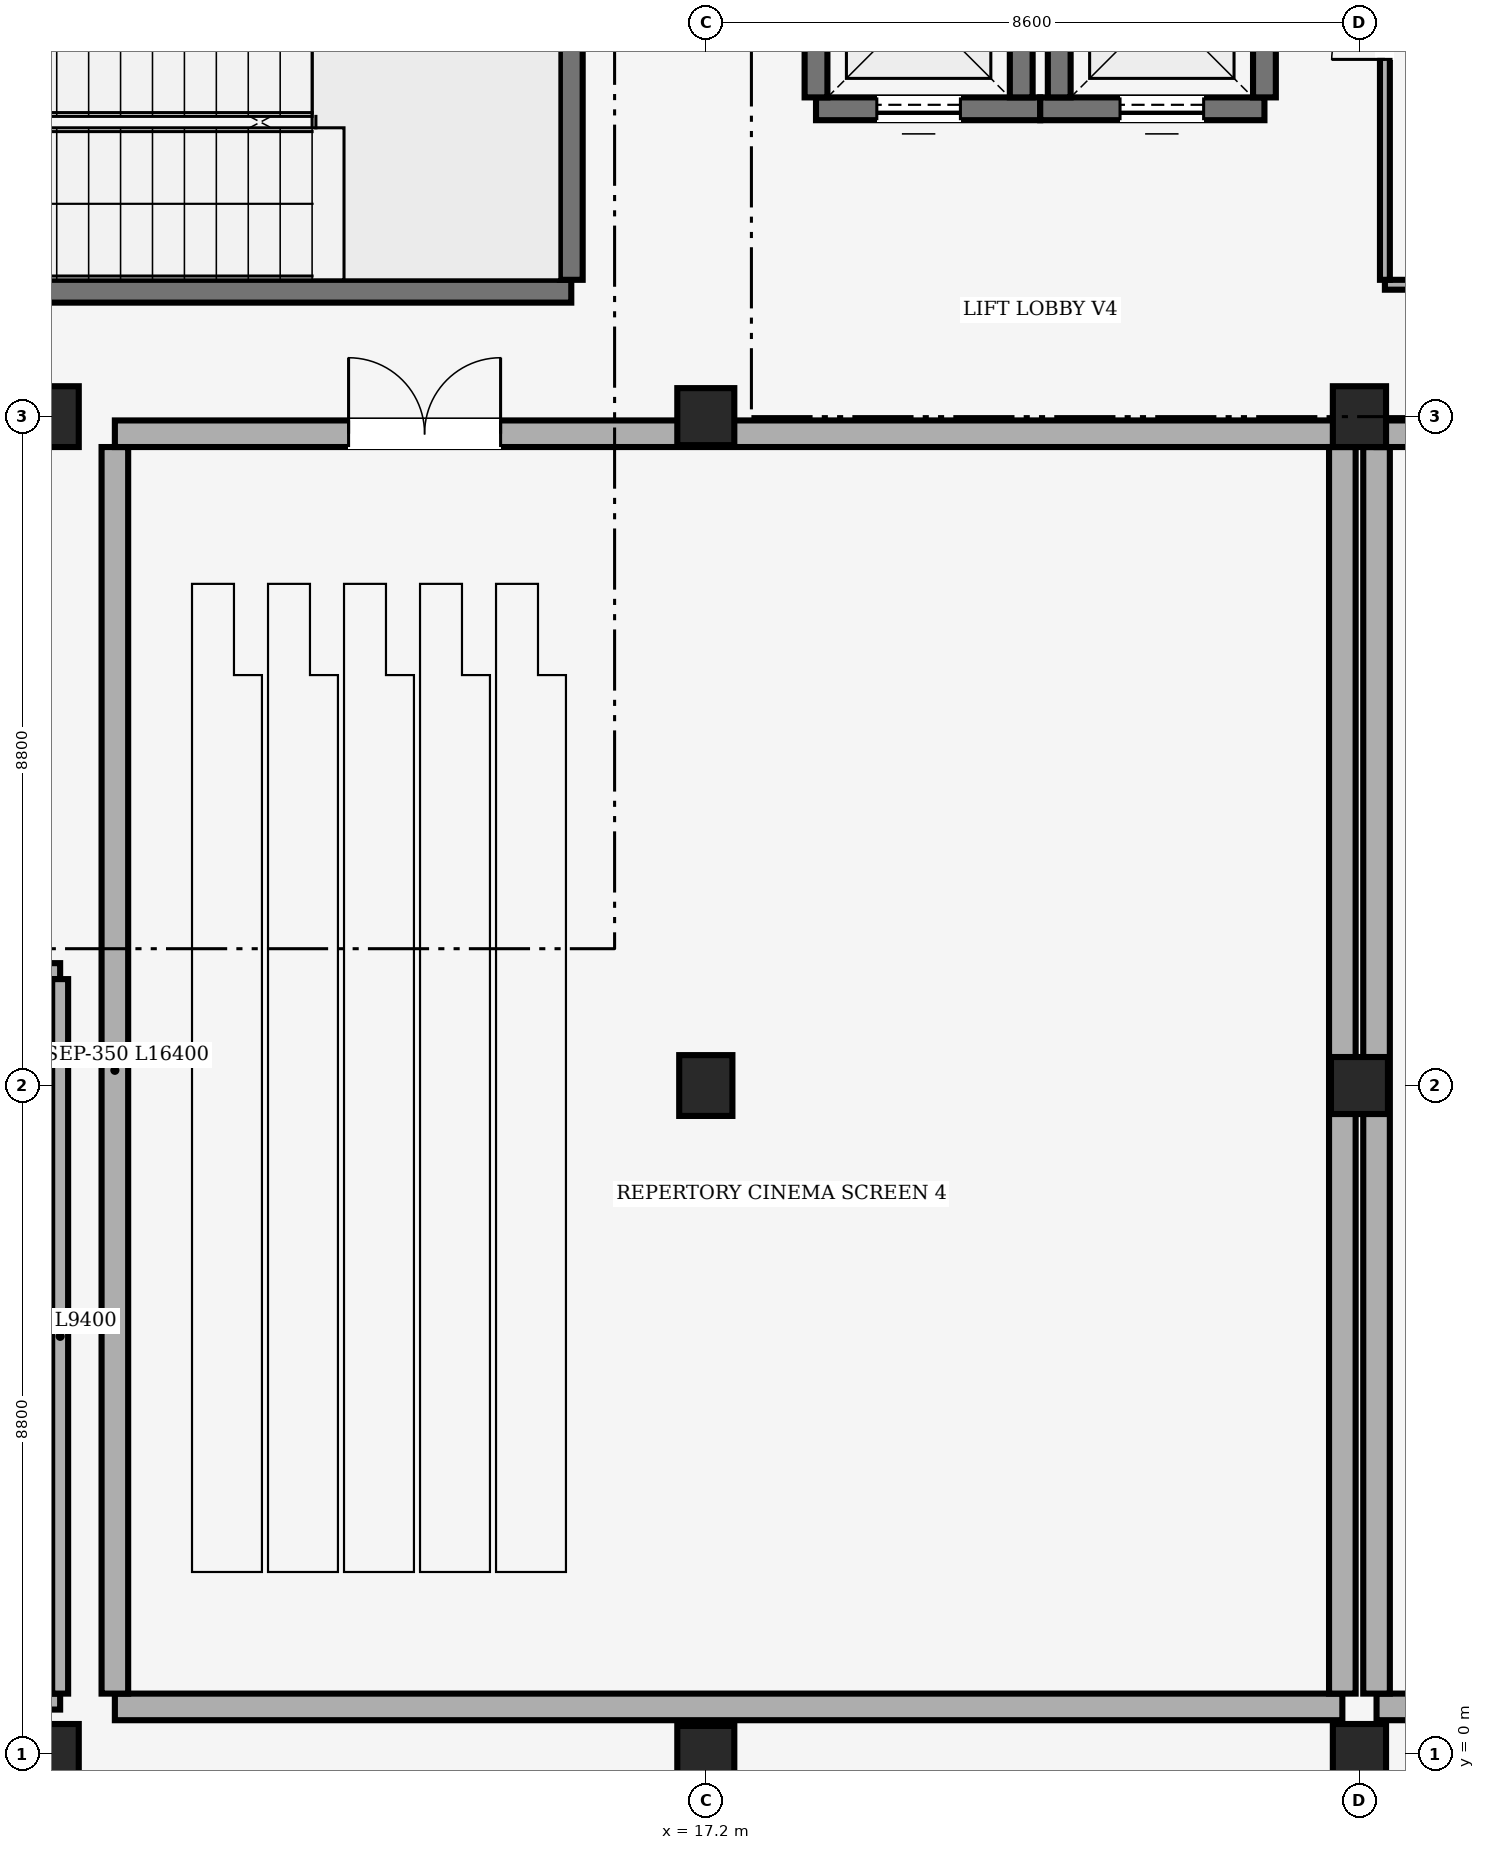
"""IFC4 building model, lengths in metres.
Left out: names, types, materials, properties, quantities, classifications, styles, units other than length and angle.
Written with IfcOpenShell. Run it as: python <this file> out.ifc"""

import sys

from ifc_helpers import new_model, si_unit, direction, frame, frame_2d, origin, origin_2d, place, context, subcontext, project, spatial, rectangle, extrude, element, fill, save


model = new_model("IFC4")
c1 = context("Model", 3, precision=1e-05, world=origin(), true_north=direction((0.0, 1.0)))
c2 = subcontext(c1, "Body", "Model", "MODEL_VIEW")
j1 = project(units=[si_unit("LENGTHUNIT", "METRE"), si_unit("PLANEANGLEUNIT", "RADIAN")], contexts=[c1])
p1 = place(None, origin())
s1 = spatial("IfcSite", under=j1, at=p1, CompositionType="ELEMENT")
p2 = place(p1, origin())
s2 = spatial("IfcBuilding", under=s1, at=p2, CompositionType="ELEMENT")
p3 = place(p2, frame((0.0, 0.0, 12.0)))
s3 = spatial("IfcBuildingStorey", under=s2, at=p3, CompositionType="ELEMENT", Elevation=12.0)
for number, where, z_axis, x_axis in (
    (1, (8.6, 0.0, 0.0), (0.0, 0.0, 1.0), (1.0, 0.0, 0.0)),
    (2, (8.6, 17.6, 0.0), (0.0, 0.0, 1.0), (1.0, 0.0, 0.0)),
):
    element("IfcColumn", number, at=place(p3, frame(where, z_axis=z_axis, x_axis=x_axis)), inside=s3, PredefinedType="COLUMN", context=c2, shape_type="SweptSolid", body=[
        extrude(rectangle(XDim=0.7, YDim=0.8, at=origin_2d()), origin(), (0.0, 0.0, 1.0), 3.35),
    ])
p4 = place(p3, frame((17.2, 0.0, 0.0), z_axis=(0.0, 0.0, 1.0), x_axis=(1.0, 0.0, 0.0)))
e3 = element("IfcColumn", 3, at=p4, inside=s3, PredefinedType="COLUMN", context=c2, shape_type="SweptSolid", body=[
    extrude(rectangle(XDim=0.75, YDim=0.75, at=origin_2d()), origin(), (0.0, 0.0, 1.0), 3.35),
])
p5 = place(p3, frame((17.2, 8.8, 0.0), z_axis=(0.0, 0.0, 1.0), x_axis=(1.0, 0.0, 0.0)))
e4 = element("IfcColumn", 4, at=p5, inside=s3, PredefinedType="COLUMN", context=c2, shape_type="SweptSolid", body=[
    extrude(rectangle(XDim=0.7, YDim=0.8, at=origin_2d()), origin(), (0.0, 0.0, 1.0), 3.35),
])
p6 = place(p3, frame((17.2, 17.6, 0.0), z_axis=(0.0, 0.0, 1.0), x_axis=(1.0, 0.0, 0.0)))
e5 = element("IfcColumn", 5, at=p6, inside=s3, PredefinedType="COLUMN", context=c2, shape_type="SweptSolid", body=[
    extrude(rectangle(XDim=0.75, YDim=0.75, at=origin_2d()), origin(), (0.0, 0.0, 1.0), 3.35),
])
p7 = place(p3, frame((25.8, 0.0, 0.0), z_axis=(0.0, 0.0, 1.0), x_axis=(1.0, 0.0, 0.0)))
e6 = element("IfcColumn", 6, at=p7, inside=s3, PredefinedType="COLUMN", context=c2, shape_type="SweptSolid", body=[
    extrude(rectangle(XDim=0.7, YDim=0.8, at=origin_2d()), origin(), (0.0, 0.0, 1.0), 3.35),
])
p8 = place(p3, frame((25.8, 8.8, 0.0), z_axis=(0.0, 0.0, 1.0), x_axis=(1.0, 0.0, 0.0)))
e7 = element("IfcColumn", 7, at=p8, inside=s3, PredefinedType="COLUMN", context=c2, shape_type="SweptSolid", body=[
    extrude(rectangle(XDim=0.75, YDim=0.75, at=origin_2d()), origin(), (0.0, 0.0, 1.0), 3.35),
])
p9 = place(p3, frame((25.8, 17.6, 0.0), z_axis=(0.0, 0.0, 1.0), x_axis=(1.0, 0.0, 0.0)))
e8 = element("IfcColumn", 8, at=p9, inside=s3, PredefinedType="COLUMN", context=c2, shape_type="SweptSolid", body=[
    extrude(rectangle(XDim=0.7, YDim=0.8, at=origin_2d()), origin(), (0.0, 0.0, 1.0), 3.35),
])
p10 = place(p3, frame((15.43, 19.25, 0.0), z_axis=(0.0, 0.0, 1.0), x_axis=(-1.0, 0.0, 0.0)))
e9 = element("IfcWall", 9, at=p10, inside=s3, PredefinedType="SHEAR", context=c2, shape_type="SweptSolid", body=[
    extrude(rectangle(XDim=10.18, YDim=0.3, at=frame_2d((5.09, 0.0))), origin(), (0.0, 0.0, 1.0), 3.35),
])
p11 = place(p3, frame((15.43, 23.55, 0.0), z_axis=(0.0, 0.0, 1.0), x_axis=(0.0, -1.0, 0.0)))
e10 = element("IfcWall", 10, at=p11, inside=s3, PredefinedType="SHEAR", context=c2, shape_type="SweptSolid", body=[
    extrude(rectangle(XDim=4.15, YDim=0.3, at=frame_2d((2.075, 0.0))), origin(), (0.0, 0.0, 1.0), 3.35),
])
p12 = place(p3, frame((21.6, 21.65, 0.0), z_axis=(0.0, 0.0, 1.0), x_axis=(-1.0, 0.0, 0.0)))
e11 = element("IfcWall", 11, at=p12, inside=s3, PredefinedType="SHEAR", context=c2, shape_type="SweptSolid", body=[
    extrude(rectangle(XDim=2.95, YDim=0.3, at=frame_2d((1.475, 0.0))), origin(), (0.0, 0.0, 1.0), 3.35),
])
p13 = place(p12, frame((1.05, 0.0, 0.0)))
e12 = element("IfcOpeningElement", 12, at=p13, cuts=e11, PredefinedType="OPENING", context=c2, shape_type="SweptSolid", body=[
    extrude(rectangle(XDim=1.1, YDim=2.1, at=frame_2d((0.55, 1.05))), frame((0.0, 0.15, 0.0), z_axis=(0.0, -1.0, 0.0), x_axis=(1.0, 0.0, 0.0)), (0.0, 0.0, 1.0), 0.3),
])
for number, where, z_axis, x_axis in (
    (13, (18.65, 21.8, 0.0), (0.0, 0.0, 1.0), (0.0, 1.0, 0.0)),
    (14, (21.35, 24.2, 0.0), (0.0, 0.0, 1.0), (0.0, -1.0, 0.0)),
):
    element("IfcWall", number, at=place(p3, frame(where, z_axis=z_axis, x_axis=x_axis)), inside=s3, PredefinedType="SHEAR", context=c2, shape_type="SweptSolid", body=[
        extrude(rectangle(XDim=2.4, YDim=0.3, at=frame_2d((1.2, 0.0))), origin(), (0.0, 0.0, 1.0), 3.35),
    ])
p14 = place(p3, frame((24.55, 21.65, 0.0), z_axis=(0.0, 0.0, 1.0), x_axis=(-1.0, 0.0, 0.0)))
e15 = element("IfcWall", 15, at=p14, inside=s3, PredefinedType="SHEAR", context=c2, shape_type="SweptSolid", body=[
    extrude(rectangle(XDim=2.95, YDim=0.3, at=frame_2d((1.475, 0.0))), origin(), (0.0, 0.0, 1.0), 3.35),
])
p15 = place(p14, frame((0.8, 0.0, 0.0)))
e16 = element("IfcOpeningElement", 16, at=p15, cuts=e15, PredefinedType="OPENING", context=c2, shape_type="SweptSolid", body=[
    extrude(rectangle(XDim=1.1, YDim=2.1, at=frame_2d((0.55, 1.05))), frame((0.0, 0.15, 0.0), z_axis=(0.0, -1.0, 0.0), x_axis=(1.0, 0.0, 0.0)), (0.0, 0.0, 1.0), 0.3),
])
for number, where, z_axis, x_axis in (
    (17, (21.85, 21.8, 0.0), (0.0, 0.0, 1.0), (0.0, 1.0, 0.0)),
    (18, (24.55, 24.2, 0.0), (0.0, 0.0, 1.0), (0.0, -1.0, 0.0)),
):
    element("IfcWall", number, at=place(p3, frame(where, z_axis=z_axis, x_axis=x_axis)), inside=s3, PredefinedType="SHEAR", context=c2, shape_type="SweptSolid", body=[
        extrude(rectangle(XDim=2.4, YDim=0.3, at=frame_2d((1.2, 0.0))), origin(), (0.0, 0.0, 1.0), 3.35),
    ])
p16 = place(p3, frame((25.575, 0.625, 0.0), z_axis=(0.0, 0.0, 1.0), x_axis=(-1.0, 0.0, 0.0)))
e19 = element("IfcWall", 19, at=p16, inside=s3, PredefinedType="SOLIDWALL", context=c2, shape_type="SweptSolid", body=[
    extrude(rectangle(XDim=16.15, YDim=0.35, at=frame_2d((8.075, 0.0))), origin(), (0.0, 0.0, 1.0), 3.33),
])
p17 = place(p3, frame((9.425, 0.8, 0.0), z_axis=(0.0, 0.0, 1.0), x_axis=(0.0, 1.0, 0.0)))
e20 = element("IfcWall", 20, at=p17, inside=s3, PredefinedType="SOLIDWALL", context=c2, shape_type="SweptSolid", body=[
    extrude(rectangle(XDim=16.4, YDim=0.35, at=frame_2d((8.2, 0.0))), origin(), (0.0, 0.0, 1.0), 3.33),
])
p18 = place(p3, frame((9.425, 17.375, 0.0), z_axis=(0.0, 0.0, 1.0), x_axis=(1.0, 0.0, 0.0)))
e21 = element("IfcWall", 21, at=p18, inside=s3, PredefinedType="SOLIDWALL", context=c2, shape_type="SweptSolid", body=[
    extrude(rectangle(XDim=16.15, YDim=0.35, at=frame_2d((8.075, 0.0))), origin(), (0.0, 0.0, 1.0), 2.63),
])
p19 = place(p18, frame((3.075, 0.0, 0.0)))
e22 = element("IfcOpeningElement", 22, at=p19, cuts=e21, PredefinedType="OPENING", context=c2, shape_type="SweptSolid", body=[
    extrude(rectangle(XDim=2.0, YDim=2.25, at=frame_2d((1.0, 1.125))), frame((0.0, 0.175, 0.0), z_axis=(0.0, -1.0, 0.0), x_axis=(1.0, 0.0, 0.0)), (0.0, 0.0, 1.0), 0.35),
])
p20 = place(p3, frame((25.575, 17.2, 0.0), z_axis=(0.0, 0.0, 1.0), x_axis=(0.0, -1.0, 0.0)))
e23 = element("IfcWall", 23, at=p20, inside=s3, PredefinedType="SOLIDWALL", context=c2, shape_type="SweptSolid", body=[
    extrude(rectangle(XDim=16.4, YDim=0.35, at=frame_2d((8.2, 0.0))), origin(), (0.0, 0.0, 1.0), 2.63),
])
p21 = place(p3, frame((42.175, 0.625, 0.0), z_axis=(0.0, 0.0, 1.0), x_axis=(-1.0, 0.0, 0.0)))
e24 = element("IfcWall", 24, at=p21, inside=s3, PredefinedType="SOLIDWALL", context=c2, shape_type="SweptSolid", body=[
    extrude(rectangle(XDim=16.15, YDim=0.35, at=frame_2d((8.075, 0.0))), origin(), (0.0, 0.0, 1.0), 3.33),
])
p22 = place(p3, frame((26.025, 0.8, 0.0), z_axis=(0.0, 0.0, 1.0), x_axis=(0.0, 1.0, 0.0)))
e25 = element("IfcWall", 25, at=p22, inside=s3, PredefinedType="SOLIDWALL", context=c2, shape_type="SweptSolid", body=[
    extrude(rectangle(XDim=16.4, YDim=0.35, at=frame_2d((8.2, 0.0))), origin(), (0.0, 0.0, 1.0), 2.63),
])
p23 = place(p3, frame((26.025, 17.375, 0.0), z_axis=(0.0, 0.0, 1.0), x_axis=(1.0, 0.0, 0.0)))
e26 = element("IfcWall", 26, at=p23, inside=s3, PredefinedType="SOLIDWALL", context=c2, shape_type="SweptSolid", body=[
    extrude(rectangle(XDim=16.15, YDim=0.35, at=frame_2d((8.075, 0.0))), origin(), (0.0, 0.0, 1.0), 2.63),
])
p24 = place(p23, frame((3.975, 0.0, 0.0)))
e27 = element("IfcOpeningElement", 27, at=p24, cuts=e26, PredefinedType="OPENING", context=c2, shape_type="SweptSolid", body=[
    extrude(rectangle(XDim=2.0, YDim=2.25, at=frame_2d((1.0, 1.125))), frame((0.0, 0.175, 0.0), z_axis=(0.0, -1.0, 0.0), x_axis=(1.0, 0.0, 0.0)), (0.0, 0.0, 1.0), 0.35),
])
p25 = place(p3, frame((42.065, 19.335, 0.0), z_axis=(0.0, 0.0, 1.0), x_axis=(-1.0, 0.0, 0.0)))
e28 = element("IfcWall", 28, at=p25, inside=s3, PredefinedType="PARTITIONING", context=c2, shape_type="SweptSolid", body=[
    extrude(rectangle(XDim=15.93, YDim=0.13, at=frame_2d((7.965, 0.0))), origin(), (0.0, 0.0, 1.0), 3.33),
])
p26 = place(p3, frame((26.135, 19.4, 0.0), z_axis=(0.0, 0.0, 1.0), x_axis=(0.0, 1.0, 0.0)))
e29 = element("IfcWall", 29, at=p26, inside=s3, PredefinedType="PARTITIONING", context=c2, shape_type="SweptSolid", body=[
    extrude(rectangle(XDim=7.4, YDim=0.13, at=frame_2d((3.7, 0.0))), origin(), (0.0, 0.0, 1.0), 2.73),
])
p27 = place(p26, frame((2.9, 0.0, 0.0)))
e30 = element("IfcOpeningElement", 30, at=p27, cuts=e29, PredefinedType="OPENING", context=c2, shape_type="SweptSolid", body=[
    extrude(rectangle(XDim=1.4, YDim=2.15, at=frame_2d((0.7, 1.075))), frame((0.0, 0.065, 0.0), z_axis=(0.0, -1.0, 0.0), x_axis=(1.0, 0.0, 0.0)), (0.0, 0.0, 1.0), 0.13),
])
p28 = place(p3, frame((8.705, 0.695, 0.0), z_axis=(0.0, 0.0, 1.0), x_axis=(-1.0, 0.0, 0.0)))
e31 = element("IfcWall", 31, at=p28, inside=s3, PredefinedType="PARTITIONING", context=c2, shape_type="SweptSolid", body=[
    extrude(rectangle(XDim=8.01, YDim=0.21, at=frame_2d((4.005, 0.0))), origin(), (0.0, 0.0, 1.0), 3.33),
])
p29 = place(p3, frame((0.695, 10.305, 0.0), z_axis=(0.0, 0.0, 1.0), x_axis=(1.0, 0.0, 0.0)))
e32 = element("IfcWall", 32, at=p29, inside=s3, PredefinedType="PARTITIONING", context=c2, shape_type="SweptSolid", body=[
    extrude(rectangle(XDim=8.01, YDim=0.21, at=frame_2d((4.005, 0.0))), origin(), (0.0, 0.0, 1.0), 3.33),
])
p30 = place(p29, frame((5.255, 0.0, 0.0)))
e33 = element("IfcOpeningElement", 33, at=p30, cuts=e32, PredefinedType="OPENING", context=c2, shape_type="SweptSolid", body=[
    extrude(rectangle(XDim=1.1, YDim=2.1, at=frame_2d((0.55, 1.05))), frame((0.0, 0.105, 0.0), z_axis=(0.0, -1.0, 0.0), x_axis=(1.0, 0.0, 0.0)), (0.0, 0.0, 1.0), 0.21),
])
p31 = place(p3, frame((8.705, 10.2, 0.0), z_axis=(0.0, 0.0, 1.0), x_axis=(0.0, -1.0, 0.0)))
e34 = element("IfcWall", 34, at=p31, inside=s3, PredefinedType="PARTITIONING", context=c2, shape_type="SweptSolid", body=[
    extrude(rectangle(XDim=9.4, YDim=0.21, at=frame_2d((4.7, 0.0))), origin(), (0.0, 0.0, 1.0), 2.68),
])
p32 = place(p13, origin())
e35 = element("IfcDoor", 35, at=p32, inside=s3, OperationType="SLIDING_TO_LEFT", PredefinedType="DOOR", context=c2, shape_type="SweptSolid", body=[
    extrude(rectangle(XDim=1.1, YDim=2.1, at=frame_2d((0.55, 1.05))), frame((0.0, 0.025, 0.0), z_axis=(0.0, -1.0, 0.0), x_axis=(1.0, 0.0, 0.0)), (0.0, 0.0, 1.0), 0.05),
])
fill(e12, e35)
p33 = place(p15, origin())
e36 = element("IfcDoor", 36, at=p33, inside=s3, OperationType="SLIDING_TO_LEFT", PredefinedType="DOOR", context=c2, shape_type="SweptSolid", body=[
    extrude(rectangle(XDim=1.1, YDim=2.1, at=frame_2d((0.55, 1.05))), frame((0.0, 0.025, 0.0), z_axis=(0.0, -1.0, 0.0), x_axis=(1.0, 0.0, 0.0)), (0.0, 0.0, 1.0), 0.05),
])
fill(e16, e36)
p34 = place(p19, origin())
e37 = element("IfcDoor", 37, at=p34, inside=s3, OperationType="DOUBLE_DOOR_SINGLE_SWING", PredefinedType="DOOR", context=c2, shape_type="SweptSolid", body=[
    extrude(rectangle(XDim=2.0, YDim=2.25, at=frame_2d((1.0, 1.125))), frame((0.0, 0.025, 0.0), z_axis=(0.0, -1.0, 0.0), x_axis=(1.0, 0.0, 0.0)), (0.0, 0.0, 1.0), 0.05),
])
fill(e22, e37)
p35 = place(p27, origin())
e38 = element("IfcDoor", 38, at=p35, inside=s3, OperationType="DOUBLE_DOOR_SINGLE_SWING", PredefinedType="DOOR", context=c2, shape_type="SweptSolid", body=[
    extrude(rectangle(XDim=1.4, YDim=2.15, at=frame_2d((0.7, 1.075))), frame((0.0, 0.025, 0.0), z_axis=(0.0, -1.0, 0.0), x_axis=(1.0, 0.0, 0.0)), (0.0, 0.0, 1.0), 0.05),
])
fill(e30, e38)
save(model, sys.argv[1])
